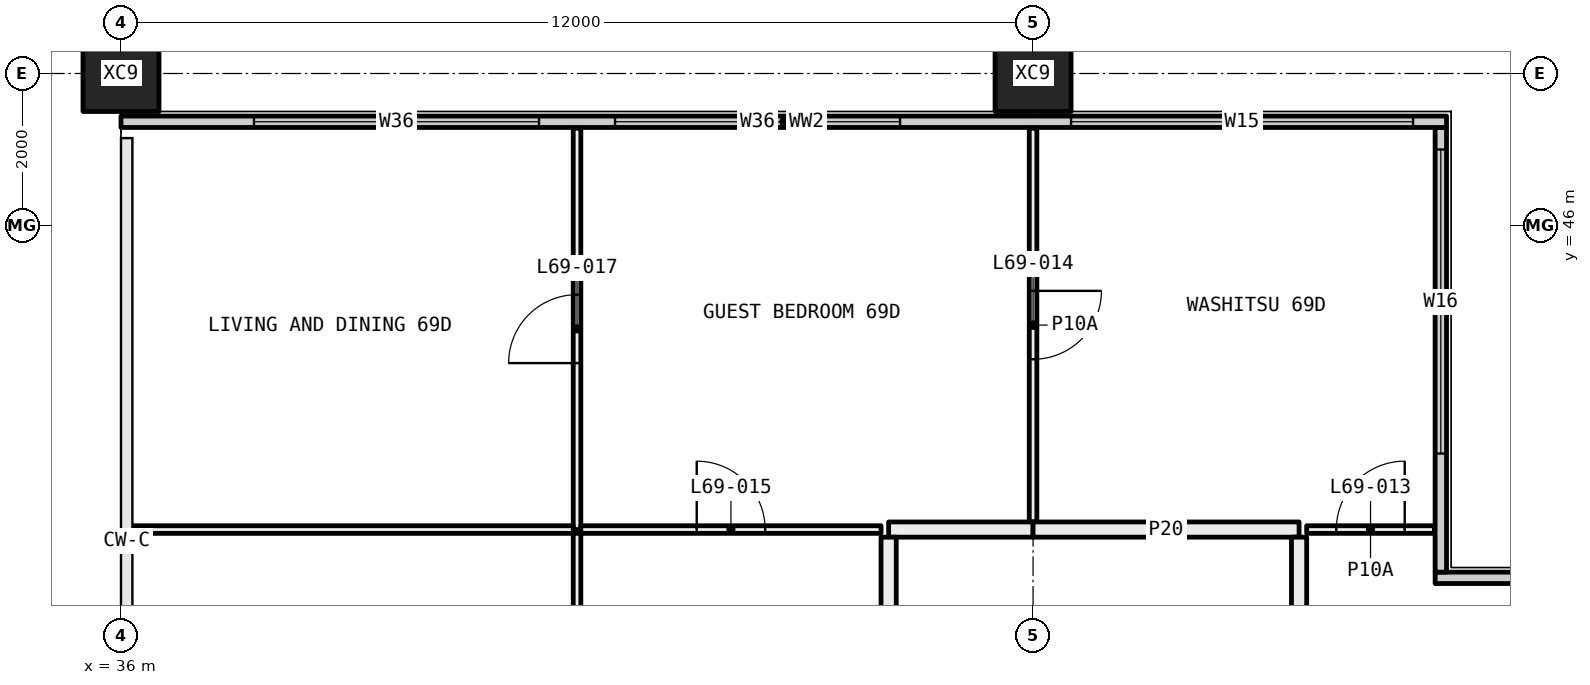
"""IFC4 building model, lengths in metres.
Left out: names, types, materials, properties, quantities, classifications, styles, units other than length and angle.
Written with IfcOpenShell. Run it as: python <this file> out.ifc"""

import sys

from ifc_helpers import new_model, si_unit, direction, frame, frame_2d, origin, origin_2d, place, context, subcontext, project, spatial, rectangle, hollow_rectangle, extrude, element, fill, save


model = new_model("IFC4")
c1 = context("Model", 3, precision=1e-05, world=origin(), true_north=direction((0.0, 1.0)))
c2 = subcontext(c1, "Body", "Model", "MODEL_VIEW")
j1 = project(units=[si_unit("LENGTHUNIT", "METRE"), si_unit("PLANEANGLEUNIT", "RADIAN")], contexts=[c1])
p1 = place(None, origin())
s1 = spatial("IfcSite", under=j1, at=p1, CompositionType="ELEMENT")
p2 = place(p1, origin())
s2 = spatial("IfcBuilding", under=s1, at=p2, CompositionType="ELEMENT")
p3 = place(p2, frame((0.0, 0.0, 255.9)))
s3 = spatial("IfcBuildingStorey", under=s2, at=p3, CompositionType="ELEMENT", Elevation=255.9)
for number, where, z_axis, x_axis in (
    (1, (36.0, 48.0, -0.4), (0.0, 0.0, 1.0), (1.0, 0.0, 0.0)),
    (2, (48.0, 48.0, -0.4), (0.0, 0.0, 1.0), (1.0, 0.0, 0.0)),
):
    element("IfcColumn", number, at=place(p3, frame(where, z_axis=z_axis, x_axis=x_axis)), inside=s3, PredefinedType="COLUMN", context=c2, shape_type="SweptSolid", body=[
        extrude(hollow_rectangle(XDim=1.0, YDim=1.0, WallThickness=0.036, at=origin_2d()), origin(), (0.0, 0.0, 1.0), 3.45),
    ])
p4 = place(p3, frame((53.29, 41.365, 0.0), z_axis=(0.0, 0.0, 1.0), x_axis=(1.0, 0.0, 0.0)))
e3 = element("IfcWall", 3, at=p4, inside=s3, PredefinedType="ELEMENTEDWALL", context=c2, shape_type="SweptSolid", body=[
    extrude(rectangle(XDim=6.15, YDim=0.15, at=frame_2d((3.075, 0.0))), origin(), (0.0, 0.0, 1.0), 3.05),
])
p5 = place(p4, frame((1.71, 0.0, 0.45)))
e4 = element("IfcOpeningElement", 4, at=p5, cuts=e3, PredefinedType="OPENING", context=c2, shape_type="SweptSolid", body=[
    extrude(rectangle(XDim=4.0, YDim=2.55, at=frame_2d((2.0, 1.275))), frame((0.0, 0.085, 0.0), z_axis=(0.0, -1.0, 0.0), x_axis=(1.0, 0.0, 0.0)), (0.0, 0.0, 1.0), 0.17),
])
p6 = place(p3, frame((53.365, 41.44, 0.0), z_axis=(0.0, 0.0, 1.0), x_axis=(0.0, 1.0, 0.0)))
e5 = element("IfcWall", 5, at=p6, inside=s3, PredefinedType="ELEMENTEDWALL", context=c2, shape_type="SweptSolid", body=[
    extrude(rectangle(XDim=5.85, YDim=0.15, at=frame_2d((2.925, 0.0))), origin(), (0.0, 0.0, 1.0), 3.05),
])
p7 = place(p6, frame((1.56, 0.0, 0.45)))
e6 = element("IfcOpeningElement", 6, at=p7, cuts=e5, PredefinedType="OPENING", context=c2, shape_type="SweptSolid", body=[
    extrude(rectangle(XDim=4.0, YDim=2.55, at=frame_2d((2.0, 1.275))), frame((0.0, 0.085, 0.0), z_axis=(0.0, -1.0, 0.0), x_axis=(1.0, 0.0, 0.0)), (0.0, 0.0, 1.0), 0.17),
])
p8 = place(p3, frame((36.0, 47.365, 0.0), z_axis=(0.0, 0.0, 1.0), x_axis=(1.0, 0.0, 0.0)))
e7 = element("IfcWall", 7, at=p8, inside=s3, PredefinedType="ELEMENTEDWALL", context=c2, shape_type="SweptSolid", body=[
    extrude(rectangle(XDim=17.44, YDim=0.15, at=frame_2d((8.72, 0.0))), origin(), (0.0, 0.0, 1.0), 3.05),
])
p9 = place(p8, frame((1.75, 0.0, 0.45)))
e8 = element("IfcOpeningElement", 8, at=p9, cuts=e7, PredefinedType="OPENING", context=c2, shape_type="SweptSolid", body=[
    extrude(rectangle(XDim=3.75, YDim=2.55, at=frame_2d((1.875, 1.275))), frame((0.0, 0.085, 0.0), z_axis=(0.0, -1.0, 0.0), x_axis=(1.0, 0.0, 0.0)), (0.0, 0.0, 1.0), 0.17),
])
p10 = place(p8, frame((6.5, 0.0, 0.45)))
e9 = element("IfcOpeningElement", 9, at=p10, cuts=e7, PredefinedType="OPENING", context=c2, shape_type="SweptSolid", body=[
    extrude(rectangle(XDim=3.75, YDim=2.55, at=frame_2d((1.875, 1.275))), frame((0.0, 0.085, 0.0), z_axis=(0.0, -1.0, 0.0), x_axis=(1.0, 0.0, 0.0)), (0.0, 0.0, 1.0), 0.17),
])
p11 = place(p8, frame((12.5, 0.0, 0.45)))
e10 = element("IfcOpeningElement", 10, at=p11, cuts=e7, PredefinedType="OPENING", context=c2, shape_type="SweptSolid", body=[
    extrude(rectangle(XDim=4.5, YDim=2.55, at=frame_2d((2.25, 1.275))), frame((0.0, 0.085, 0.0), z_axis=(0.0, -1.0, 0.0), x_axis=(1.0, 0.0, 0.0)), (0.0, 0.0, 1.0), 0.17),
])
p12 = place(p3, frame((42.0, 42.0, 0.0), z_axis=(0.0, 0.0, 1.0), x_axis=(0.0, 1.0, 0.0)))
e11 = element("IfcWall", 11, at=p12, inside=s3, PredefinedType="PARTITIONING", context=c2, shape_type="SweptSolid", body=[
    extrude(rectangle(XDim=5.28, YDim=0.1, at=frame_2d((2.64, 0.0))), origin(), (0.0, 0.0, 1.0), 3.05),
])
p13 = place(p12, frame((2.19, 0.0, 0.0)))
e12 = element("IfcOpeningElement", 12, at=p13, cuts=e11, PredefinedType="OPENING", context=c2, shape_type="SweptSolid", body=[
    extrude(rectangle(XDim=0.9, YDim=2.1, at=frame_2d((0.45, 1.05))), frame((0.0, 0.06, 0.0), z_axis=(0.0, -1.0, 0.0), x_axis=(1.0, 0.0, 0.0)), (0.0, 0.0, 1.0), 0.12),
])
p14 = place(p3, frame((36.1, 42.0, 0.0), z_axis=(0.0, 0.0, 1.0), x_axis=(1.0, 0.0, 0.0)))
e13 = element("IfcWall", 13, at=p14, inside=s3, PredefinedType="PARTITIONING", context=c2, shape_type="SweptSolid", body=[
    extrude(rectangle(XDim=5.85, YDim=0.1, at=frame_2d((2.925, 0.0))), origin(), (0.0, 0.0, 1.0), 3.05),
])
p15 = place(p3, frame((48.0, 42.1, 0.0), z_axis=(0.0, 0.0, 1.0), x_axis=(0.0, 1.0, 0.0)))
e14 = element("IfcWall", 14, at=p15, inside=s3, PredefinedType="PARTITIONING", context=c2, shape_type="SweptSolid", body=[
    extrude(rectangle(XDim=5.18, YDim=0.1, at=frame_2d((2.59, 0.0))), origin(), (0.0, 0.0, 1.0), 3.05),
])
p16 = place(p15, frame((2.14, 0.0, 0.0)))
e15 = element("IfcOpeningElement", 15, at=p16, cuts=e14, PredefinedType="OPENING", context=c2, shape_type="SweptSolid", body=[
    extrude(rectangle(XDim=0.9, YDim=2.1, at=frame_2d((0.45, 1.05))), frame((0.0, 0.06, 0.0), z_axis=(0.0, -1.0, 0.0), x_axis=(1.0, 0.0, 0.0)), (0.0, 0.0, 1.0), 0.12),
])
p17 = place(p3, frame((42.05, 42.0, 0.0), z_axis=(0.0, 0.0, 1.0), x_axis=(1.0, 0.0, 0.0)))
e16 = element("IfcWall", 16, at=p17, inside=s3, PredefinedType="PARTITIONING", context=c2, shape_type="SweptSolid", body=[
    extrude(rectangle(XDim=3.95, YDim=0.1, at=frame_2d((1.975, 0.0))), origin(), (0.0, 0.0, 1.0), 3.05),
])
p18 = place(p17, frame((1.525, 0.0, 0.0)))
e17 = element("IfcOpeningElement", 17, at=p18, cuts=e16, PredefinedType="OPENING", context=c2, shape_type="SweptSolid", body=[
    extrude(rectangle(XDim=0.9, YDim=2.1, at=frame_2d((0.45, 1.05))), frame((0.0, 0.06, 0.0), z_axis=(0.0, -1.0, 0.0), x_axis=(1.0, 0.0, 0.0)), (0.0, 0.0, 1.0), 0.12),
])
p19 = place(p3, frame((46.1, 42.0, 0.0), z_axis=(0.0, 0.0, 1.0), x_axis=(1.0, 0.0, 0.0)))
e18 = element("IfcWall", 18, at=p19, inside=s3, PredefinedType="PARTITIONING", context=c2, shape_type="SweptSolid", body=[
    extrude(rectangle(XDim=1.9, YDim=0.2, at=frame_2d((0.95, 0.0))), origin(), (0.0, 0.0, 1.0), 3.05),
])
p20 = place(p3, frame((51.6, 42.0, 0.0), z_axis=(0.0, 0.0, 1.0), x_axis=(1.0, 0.0, 0.0)))
e19 = element("IfcWall", 19, at=p20, inside=s3, PredefinedType="PARTITIONING", context=c2, shape_type="SweptSolid", body=[
    extrude(rectangle(XDim=1.68, YDim=0.1, at=frame_2d((0.84, 0.0))), origin(), (0.0, 0.0, 1.0), 3.05),
])
p21 = place(p20, frame((0.39, 0.0, 0.0)))
e20 = element("IfcOpeningElement", 20, at=p21, cuts=e19, PredefinedType="OPENING", context=c2, shape_type="SweptSolid", body=[
    extrude(rectangle(XDim=0.9, YDim=2.1, at=frame_2d((0.45, 1.05))), frame((0.0, 0.06, 0.0), z_axis=(0.0, -1.0, 0.0), x_axis=(1.0, 0.0, 0.0)), (0.0, 0.0, 1.0), 0.12),
])
p22 = place(p3, frame((48.0, 42.0, 0.0), z_axis=(0.0, 0.0, 1.0), x_axis=(1.0, 0.0, 0.0)))
e21 = element("IfcWall", 21, at=p22, inside=s3, PredefinedType="PARTITIONING", context=c2, shape_type="SweptSolid", body=[
    extrude(rectangle(XDim=3.5, YDim=0.2, at=frame_2d((1.75, 0.0))), origin(), (0.0, 0.0, 1.0), 3.05),
])
p23 = place(p3, frame((51.5, 41.9, 0.0), z_axis=(0.0, 0.0, 1.0), x_axis=(0.0, -1.0, 0.0)))
e22 = element("IfcWall", 22, at=p23, inside=s3, PredefinedType="PARTITIONING", context=c2, shape_type="SweptSolid", body=[
    extrude(rectangle(XDim=3.4, YDim=0.2, at=frame_2d((1.7, 0.0))), origin(), (0.0, 0.0, 1.0), 3.05),
])
p24 = place(p23, frame((1.2, 0.0, 0.0)))
e23 = element("IfcOpeningElement", 23, at=p24, cuts=e22, PredefinedType="OPENING", context=c2, shape_type="SweptSolid", body=[
    extrude(rectangle(XDim=1.0, YDim=2.1, at=frame_2d((0.5, 1.05))), frame((0.0, 0.11, 0.0), z_axis=(0.0, -1.0, 0.0), x_axis=(1.0, 0.0, 0.0)), (0.0, 0.0, 1.0), 0.22),
])
p25 = place(p3, frame((42.0, 39.05, 0.0), z_axis=(0.0, 0.0, 1.0), x_axis=(0.0, 1.0, 0.0)))
e24 = element("IfcWall", 24, at=p25, inside=s3, PredefinedType="PARTITIONING", context=c2, shape_type="SweptSolid", body=[
    extrude(rectangle(XDim=2.9, YDim=0.1, at=frame_2d((1.45, 0.0))), origin(), (0.0, 0.0, 1.0), 3.05),
])
p26 = place(p3, frame((46.1, 38.6, 0.0), z_axis=(0.0, 0.0, 1.0), x_axis=(0.0, 1.0, 0.0)))
e25 = element("IfcWall", 25, at=p26, inside=s3, PredefinedType="PARTITIONING", context=c2, shape_type="SweptSolid", body=[
    extrude(rectangle(XDim=3.3, YDim=0.2, at=frame_2d((1.65, 0.0))), origin(), (0.0, 0.0, 1.0), 3.05),
])
p27 = place(p7, origin())
e26 = element("IfcWindow", 26, at=p27, inside=s3, PartitioningType="SINGLE_PANEL", PredefinedType="WINDOW", context=c2, shape_type="SweptSolid", body=[
    extrude(rectangle(XDim=4.0, YDim=2.55, at=frame_2d((2.0, 1.275))), frame((0.0, 0.03, 0.0), z_axis=(0.0, -1.0, 0.0), x_axis=(1.0, 0.0, 0.0)), (0.0, 0.0, 1.0), 0.06),
])
fill(e6, e26)
p28 = place(p9, origin())
e27 = element("IfcWindow", 27, at=p28, inside=s3, PartitioningType="SINGLE_PANEL", PredefinedType="WINDOW", context=c2, shape_type="SweptSolid", body=[
    extrude(rectangle(XDim=3.75, YDim=2.55, at=frame_2d((1.875, 1.275))), frame((0.0, 0.03, 0.0), z_axis=(0.0, -1.0, 0.0), x_axis=(1.0, 0.0, 0.0)), (0.0, 0.0, 1.0), 0.06),
])
fill(e8, e27)
p29 = place(p10, origin())
e28 = element("IfcWindow", 28, at=p29, inside=s3, PartitioningType="SINGLE_PANEL", PredefinedType="WINDOW", context=c2, shape_type="SweptSolid", body=[
    extrude(rectangle(XDim=3.75, YDim=2.55, at=frame_2d((1.875, 1.275))), frame((0.0, 0.03, 0.0), z_axis=(0.0, -1.0, 0.0), x_axis=(1.0, 0.0, 0.0)), (0.0, 0.0, 1.0), 0.06),
])
fill(e9, e28)
p30 = place(p11, origin())
e29 = element("IfcWindow", 29, at=p30, inside=s3, PartitioningType="SINGLE_PANEL", PredefinedType="WINDOW", context=c2, shape_type="SweptSolid", body=[
    extrude(rectangle(XDim=4.5, YDim=2.55, at=frame_2d((2.25, 1.275))), frame((0.0, 0.03, 0.0), z_axis=(0.0, -1.0, 0.0), x_axis=(1.0, 0.0, 0.0)), (0.0, 0.0, 1.0), 0.06),
])
fill(e10, e29)
p31 = place(p21, origin())
e30 = element("IfcDoor", 30, at=p31, inside=s3, OperationType="SINGLE_SWING_LEFT", PredefinedType="DOOR", context=c2, shape_type="SweptSolid", body=[
    extrude(rectangle(XDim=0.9, YDim=2.1, at=frame_2d((0.45, 1.05))), frame((0.0, 0.025, 0.0), z_axis=(0.0, -1.0, 0.0), x_axis=(1.0, 0.0, 0.0)), (0.0, 0.0, 1.0), 0.05),
])
fill(e20, e30)
p32 = place(p16, frame((0.9, 0.0, 0.0), x_axis=(-1.0, 0.0, 0.0)))
e31 = element("IfcDoor", 31, at=p32, inside=s3, OperationType="SINGLE_SWING_RIGHT", PredefinedType="DOOR", context=c2, shape_type="SweptSolid", body=[
    extrude(rectangle(XDim=0.9, YDim=2.1, at=frame_2d((0.45, 1.05))), frame((0.0, 0.025, 0.0), z_axis=(0.0, -1.0, 0.0), x_axis=(1.0, 0.0, 0.0)), (0.0, 0.0, 1.0), 0.05),
])
fill(e15, e31)
p33 = place(p18, origin())
e32 = element("IfcDoor", 32, at=p33, inside=s3, OperationType="SINGLE_SWING_RIGHT", PredefinedType="DOOR", context=c2, shape_type="SweptSolid", body=[
    extrude(rectangle(XDim=0.9, YDim=2.1, at=frame_2d((0.45, 1.05))), frame((0.0, 0.025, 0.0), z_axis=(0.0, -1.0, 0.0), x_axis=(1.0, 0.0, 0.0)), (0.0, 0.0, 1.0), 0.05),
])
fill(e17, e32)
p34 = place(p13, origin())
e33 = element("IfcDoor", 33, at=p34, inside=s3, OperationType="SINGLE_SWING_RIGHT", PredefinedType="DOOR", context=c2, shape_type="SweptSolid", body=[
    extrude(rectangle(XDim=0.9, YDim=2.1, at=frame_2d((0.45, 1.05))), frame((0.0, 0.025, 0.0), z_axis=(0.0, -1.0, 0.0), x_axis=(1.0, 0.0, 0.0)), (0.0, 0.0, 1.0), 0.05),
])
fill(e12, e33)
save(model, sys.argv[1])
